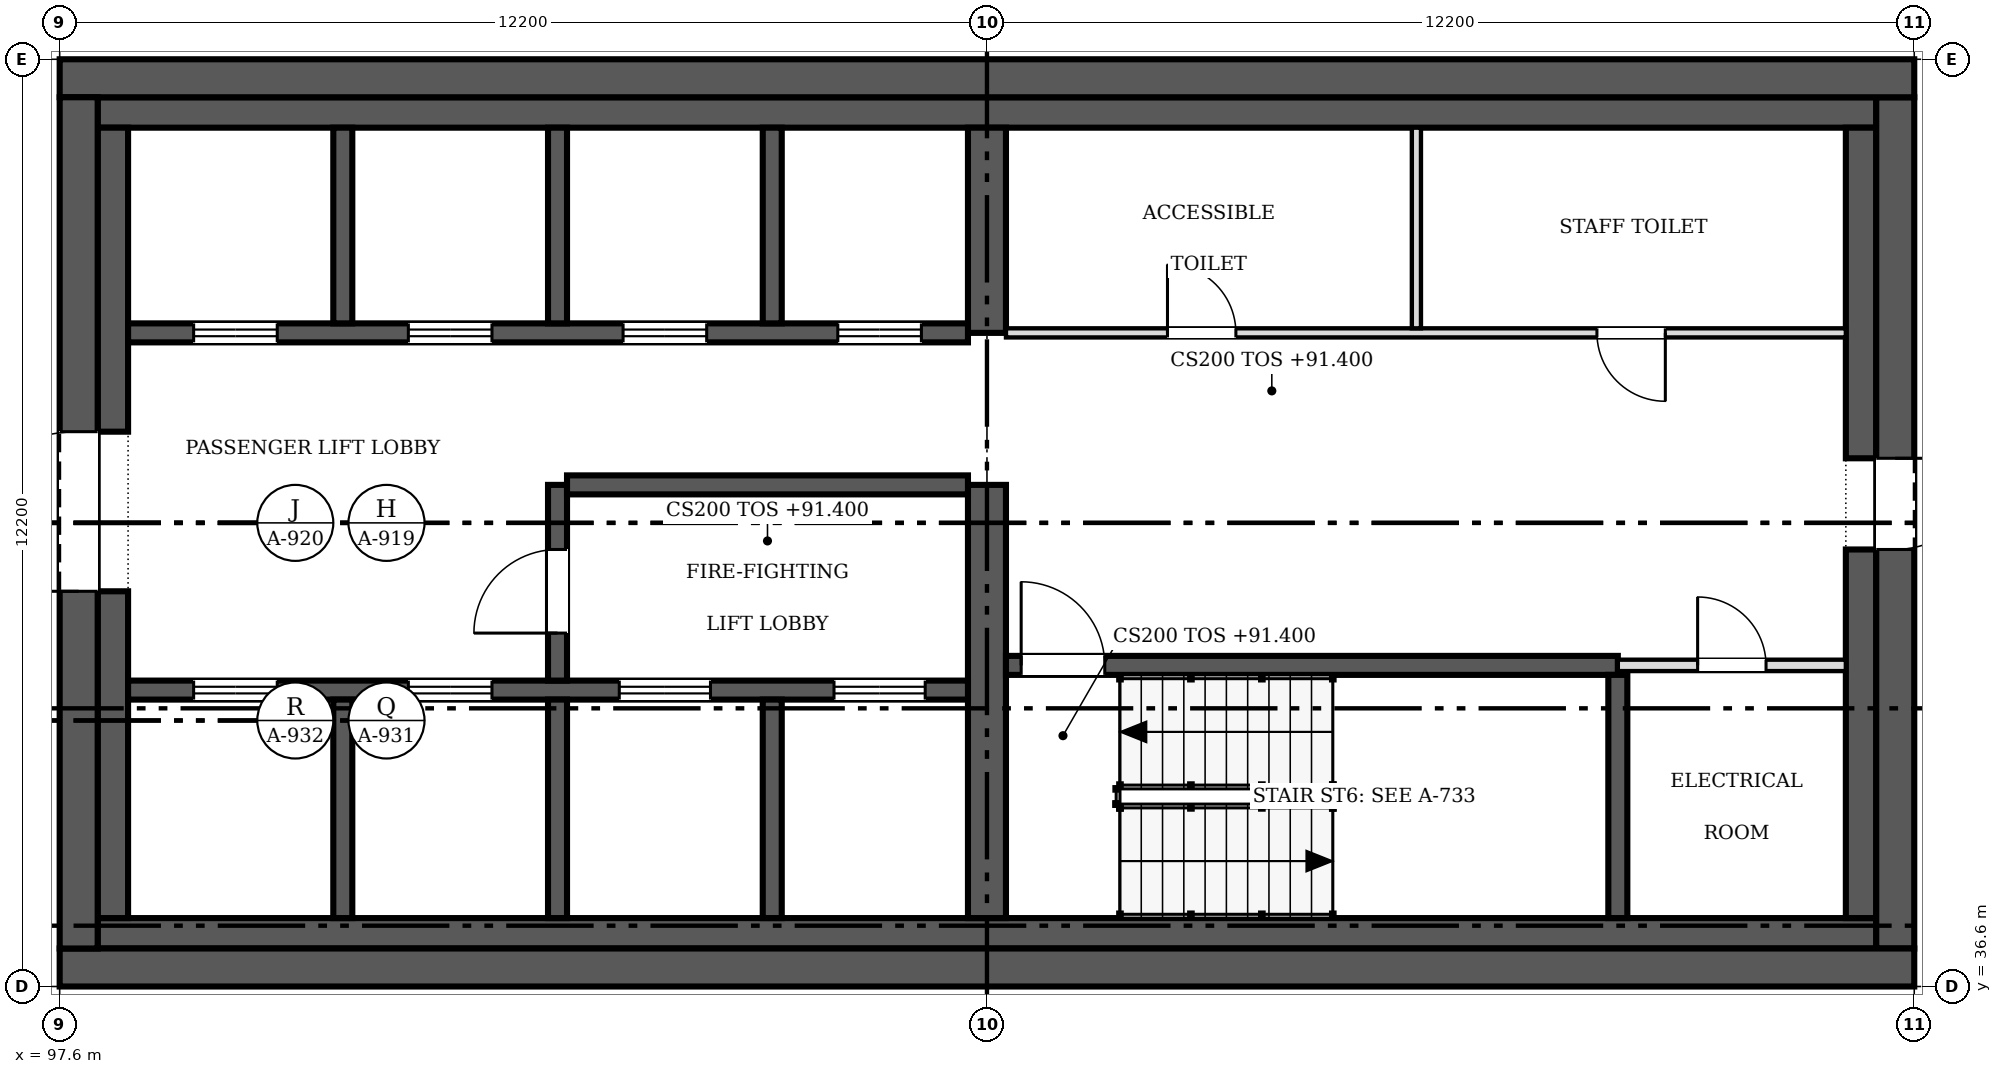
"""IFC4 building model, lengths in metres.
Left out: names, types, materials, properties, quantities, classifications, styles, units other than length and angle.
Written with IfcOpenShell. Run it as: python <this file> out.ifc"""

import sys

from ifc_helpers import new_model, si_unit, direction, frame, frame_2d, origin, place, context, subcontext, project, spatial, rectangle, extrude, source, transform, mapped, element, fill, save


model = new_model("IFC4")
c1 = context("Model", 3, precision=1e-05, world=origin(), true_north=direction((0.0, 1.0)))
c2 = subcontext(c1, "Body", "Model", "MODEL_VIEW")
j1 = project(units=[si_unit("LENGTHUNIT", "METRE"), si_unit("PLANEANGLEUNIT", "RADIAN")], contexts=[c1])
p1 = place(None, origin())
s1 = spatial("IfcSite", under=j1, at=p1, CompositionType="ELEMENT")
p2 = place(p1, origin())
s2 = spatial("IfcBuilding", under=s1, at=p2, CompositionType="ELEMENT")
p3 = place(p2, frame((0.0, 0.0, 91.4)))
s3 = spatial("IfcBuildingStorey", under=s2, at=p3, CompositionType="ELEMENT", Elevation=91.4)
p4 = place(p3, frame((122.0, 36.85, 0.0), z_axis=(0.0, 0.0, 1.0), x_axis=(-1.0, 0.0, 0.0)))
e1 = element("IfcWall", 1, at=p4, inside=s3, PredefinedType="SHEAR", context=c2, shape_type="SweptSolid", body=[
    extrude(rectangle(XDim=24.4, YDim=0.5, at=frame_2d((12.2, 0.0))), origin(), (0.0, 0.0, 1.0), 3.8),
])
p5 = place(p3, frame((97.85, 37.1, 0.0), z_axis=(0.0, 0.0, 1.0), x_axis=(0.0, 1.0, 0.0)))
e2 = element("IfcWall", 2, at=p5, inside=s3, PredefinedType="SHEAR", context=c2, shape_type="SweptSolid", body=[
    extrude(rectangle(XDim=11.2, YDim=0.5, at=frame_2d((5.6, 0.0))), origin(), (0.0, 0.0, 1.0), 3.8),
])
m1 = source(origin(), c2, "Body", "SweptSolid", [
    extrude(rectangle(XDim=2.1, YDim=2.4, at=frame_2d((1.05, 1.2))), frame((0.0, 0.26, 0.0), z_axis=(0.0, -1.0, 0.0), x_axis=(1.0, 0.0, 0.0)), (0.0, 0.0, 1.0), 0.52),
])
p6 = place(p5, frame((4.7, 0.0, 0.0)))
e3 = element("IfcOpeningElement", 3, at=p6, cuts=e2, PredefinedType="OPENING", context=c2, shape_type="MappedRepresentation", body=[
    mapped(m1, transform((0.0, 0.0, 0.0), scale=1.0)),
])
p7 = place(p3, frame((97.6, 48.55, 0.0), z_axis=(0.0, 0.0, 1.0), x_axis=(1.0, 0.0, 0.0)))
e4 = element("IfcWall", 4, at=p7, inside=s3, PredefinedType="SHEAR", context=c2, shape_type="SweptSolid", body=[
    extrude(rectangle(XDim=24.4, YDim=0.5, at=frame_2d((12.2, 0.0))), origin(), (0.0, 0.0, 1.0), 3.8),
])
p8 = place(p3, frame((121.75, 48.3, 0.0), z_axis=(0.0, 0.0, 1.0), x_axis=(0.0, -1.0, 0.0)))
e5 = element("IfcWall", 5, at=p8, inside=s3, PredefinedType="SHEAR", context=c2, shape_type="SweptSolid", body=[
    extrude(rectangle(XDim=11.2, YDim=0.5, at=frame_2d((5.6, 0.0))), origin(), (0.0, 0.0, 1.0), 3.8),
])
m2 = source(origin(), c2, "Body", "SweptSolid", [
    extrude(rectangle(XDim=1.2, YDim=2.1, at=frame_2d((0.6, 1.05))), frame((0.0, 0.26, 0.0), z_axis=(0.0, -1.0, 0.0), x_axis=(1.0, 0.0, 0.0)), (0.0, 0.0, 1.0), 0.52),
])
p9 = place(p8, frame((4.75, 0.0, 0.0)))
e6 = element("IfcOpeningElement", 6, at=p9, cuts=e5, PredefinedType="OPENING", context=c2, shape_type="MappedRepresentation", body=[
    mapped(m2, transform((0.0, 0.0, 0.0), scale=1.0)),
])
for number, where, z_axis, x_axis in (
    (7, (98.1, 37.3, 0.0), (0.0, 0.0, 1.0), (1.0, 0.0, 0.0)),
    (8, (98.1, 48.1, 0.0), (0.0, 0.0, 1.0), (1.0, 0.0, 0.0)),
):
    element("IfcWall", number, at=place(p3, frame(where, z_axis=z_axis, x_axis=x_axis)), inside=s3, PredefinedType="SOLIDWALL", context=c2, shape_type="SweptSolid", body=[
        extrude(rectangle(XDim=23.4, YDim=0.4, at=frame_2d((11.7, 0.0))), origin(), (0.0, 0.0, 1.0), 3.8),
    ])
p10 = place(p3, frame((98.3, 37.5, 0.0), z_axis=(0.0, 0.0, 1.0), x_axis=(0.0, 1.0, 0.0)))
e9 = element("IfcWall", 9, at=p10, inside=s3, PredefinedType="SOLIDWALL", context=c2, shape_type="SweptSolid", body=[
    extrude(rectangle(XDim=4.3, YDim=0.4, at=frame_2d((2.15, 0.0))), origin(), (0.0, 0.0, 1.0), 3.8),
])
p11 = place(p3, frame((98.3, 43.9, 0.0), z_axis=(0.0, 0.0, 1.0), x_axis=(0.0, 1.0, 0.0)))
e10 = element("IfcWall", 10, at=p11, inside=s3, PredefinedType="SOLIDWALL", context=c2, shape_type="SweptSolid", body=[
    extrude(rectangle(XDim=4.0, YDim=0.4, at=frame_2d((2.0, 0.0))), origin(), (0.0, 0.0, 1.0), 3.8),
])
p12 = place(p3, frame((121.3, 37.5, 0.0), z_axis=(0.0, 0.0, 1.0), x_axis=(0.0, 1.0, 0.0)))
e11 = element("IfcWall", 11, at=p12, inside=s3, PredefinedType="SOLIDWALL", context=c2, shape_type="SweptSolid", body=[
    extrude(rectangle(XDim=4.85, YDim=0.4, at=frame_2d((2.425, 0.0))), origin(), (0.0, 0.0, 1.0), 3.8),
])
p13 = place(p3, frame((121.3, 43.55, 0.0), z_axis=(0.0, 0.0, 1.0), x_axis=(0.0, 1.0, 0.0)))
e12 = element("IfcWall", 12, at=p13, inside=s3, PredefinedType="SOLIDWALL", context=c2, shape_type="SweptSolid", body=[
    extrude(rectangle(XDim=4.35, YDim=0.4, at=frame_2d((2.175, 0.0))), origin(), (0.0, 0.0, 1.0), 3.8),
])
p14 = place(p3, frame((109.8, 37.5, 0.0), z_axis=(0.0, 0.0, 1.0), x_axis=(0.0, 1.0, 0.0)))
e13 = element("IfcWall", 13, at=p14, inside=s3, PredefinedType="SHEAR", context=c2, shape_type="SweptSolid", body=[
    extrude(rectangle(XDim=5.7, YDim=0.5, at=frame_2d((2.85, 0.0))), origin(), (0.0, 0.0, 1.0), 3.8),
])
p15 = place(p3, frame((109.8, 45.2, 0.0), z_axis=(0.0, 0.0, 1.0), x_axis=(0.0, 1.0, 0.0)))
e14 = element("IfcWall", 14, at=p15, inside=s3, PredefinedType="SHEAR", context=c2, shape_type="SweptSolid", body=[
    extrude(rectangle(XDim=2.7, YDim=0.5, at=frame_2d((1.35, 0.0))), origin(), (0.0, 0.0, 1.0), 3.8),
])
p16 = place(p3, frame((98.5, 40.5, 0.0), z_axis=(0.0, 0.0, 1.0), x_axis=(1.0, 0.0, 0.0)))
e15 = element("IfcWall", 15, at=p16, inside=s3, PredefinedType="SOLIDWALL", context=c2, shape_type="SweptSolid", body=[
    extrude(rectangle(XDim=11.05, YDim=0.25, at=frame_2d((5.525, 0.0))), origin(), (0.0, 0.0, 1.0), 3.8),
])
m3 = source(origin(), c2, "Body", "SweptSolid", [
    extrude(rectangle(XDim=1.1, YDim=2.1, at=frame_2d((0.55, 1.05))), frame((0.0, 0.135, 0.0), z_axis=(0.0, -1.0, 0.0), x_axis=(1.0, 0.0, 0.0)), (0.0, 0.0, 1.0), 0.27),
])
p17 = place(p16, frame((0.863, 0.0, 0.0)))
e16 = element("IfcOpeningElement", 16, at=p17, cuts=e15, PredefinedType="OPENING", context=c2, shape_type="MappedRepresentation", body=[
    mapped(m3, transform((0.0, 0.0, 0.0), scale=1.0)),
])
p18 = place(p16, frame((3.688, 0.0, 0.0)))
e17 = element("IfcOpeningElement", 17, at=p18, cuts=e15, PredefinedType="OPENING", context=c2, shape_type="MappedRepresentation", body=[
    mapped(m3, transform((0.0, 0.0, 0.0), scale=1.0)),
])
m4 = source(origin(), c2, "Body", "SweptSolid", [
    extrude(rectangle(XDim=1.2, YDim=2.1, at=frame_2d((0.6, 1.05))), frame((0.0, 0.135, 0.0), z_axis=(0.0, -1.0, 0.0), x_axis=(1.0, 0.0, 0.0)), (0.0, 0.0, 1.0), 0.27),
])
p19 = place(p16, frame((6.462, 0.0, 0.0)))
e18 = element("IfcOpeningElement", 18, at=p19, cuts=e15, PredefinedType="OPENING", context=c2, shape_type="MappedRepresentation", body=[
    mapped(m4, transform((0.0, 0.0, 0.0), scale=1.0)),
])
p20 = place(p16, frame((9.288, 0.0, 0.0)))
e19 = element("IfcOpeningElement", 19, at=p20, cuts=e15, PredefinedType="OPENING", context=c2, shape_type="MappedRepresentation", body=[
    mapped(m4, transform((0.0, 0.0, 0.0), scale=1.0)),
])
p21 = place(p3, frame((109.55, 45.2, 0.0), z_axis=(0.0, 0.0, 1.0), x_axis=(-1.0, 0.0, 0.0)))
e20 = element("IfcWall", 20, at=p21, inside=s3, PredefinedType="SOLIDWALL", context=c2, shape_type="SweptSolid", body=[
    extrude(rectangle(XDim=11.05, YDim=0.25, at=frame_2d((5.525, 0.0))), origin(), (0.0, 0.0, 1.0), 3.8),
])
p22 = place(p21, frame((9.087, 0.0, 0.0)))
e21 = element("IfcOpeningElement", 21, at=p22, cuts=e20, PredefinedType="OPENING", context=c2, shape_type="MappedRepresentation", body=[
    mapped(m3, transform((0.0, 0.0, 0.0), scale=1.0)),
])
p23 = place(p21, frame((6.262, 0.0, 0.0)))
e22 = element("IfcOpeningElement", 22, at=p23, cuts=e20, PredefinedType="OPENING", context=c2, shape_type="MappedRepresentation", body=[
    mapped(m3, transform((0.0, 0.0, 0.0), scale=1.0)),
])
p24 = place(p21, frame((3.438, 0.0, 0.0)))
e23 = element("IfcOpeningElement", 23, at=p24, cuts=e20, PredefinedType="OPENING", context=c2, shape_type="MappedRepresentation", body=[
    mapped(m3, transform((0.0, 0.0, 0.0), scale=1.0)),
])
p25 = place(p21, frame((0.613, 0.0, 0.0)))
e24 = element("IfcOpeningElement", 24, at=p25, cuts=e20, PredefinedType="OPENING", context=c2, shape_type="MappedRepresentation", body=[
    mapped(m3, transform((0.0, 0.0, 0.0), scale=1.0)),
])
p26 = place(p3, frame((118.1, 40.825, 0.0), z_axis=(0.0, 0.0, 1.0), x_axis=(-1.0, 0.0, 0.0)))
e25 = element("IfcWall", 25, at=p26, inside=s3, PredefinedType="SOLIDWALL", context=c2, shape_type="SweptSolid", body=[
    extrude(rectangle(XDim=8.05, YDim=0.25, at=frame_2d((4.025, 0.0))), origin(), (0.0, 0.0, 1.0), 3.8),
])
p27 = place(p26, frame((6.75, 0.0, 0.0)))
e26 = element("IfcOpeningElement", 26, at=p27, cuts=e25, PredefinedType="OPENING", context=c2, shape_type="MappedRepresentation", body=[
    mapped(m3, transform((0.0, 0.0, 0.0), scale=1.0)),
])
p28 = place(p3, frame((104.15, 37.5, 0.0), z_axis=(0.0, 0.0, 1.0), x_axis=(0.0, 1.0, 0.0)))
e27 = element("IfcWall", 27, at=p28, inside=s3, PredefinedType="SOLIDWALL", context=c2, shape_type="SweptSolid", body=[
    extrude(rectangle(XDim=2.875, YDim=0.25, at=frame_2d((1.438, 0.0))), origin(), (0.0, 0.0, 1.0), 3.8),
])
p29 = place(p3, frame((104.15, 43.2, 0.0), z_axis=(0.0, 0.0, 1.0), x_axis=(0.0, -1.0, 0.0)))
e28 = element("IfcWall", 28, at=p29, inside=s3, PredefinedType="SOLIDWALL", context=c2, shape_type="SweptSolid", body=[
    extrude(rectangle(XDim=2.575, YDim=0.25, at=frame_2d((1.288, 0.0))), origin(), (0.0, 0.0, 1.0), 3.8),
])
p30 = place(p29, frame((0.85, 0.0, 0.0)))
e29 = element("IfcOpeningElement", 29, at=p30, cuts=e28, PredefinedType="OPENING", context=c2, shape_type="MappedRepresentation", body=[
    mapped(m3, transform((0.0, 0.0, 0.0), scale=1.0)),
])
p31 = place(p3, frame((104.275, 43.2, 0.0), z_axis=(0.0, 0.0, 1.0), x_axis=(1.0, 0.0, 0.0)))
e30 = element("IfcWall", 30, at=p31, inside=s3, PredefinedType="SOLIDWALL", context=c2, shape_type="SweptSolid", body=[
    extrude(rectangle(XDim=5.275, YDim=0.25, at=frame_2d((2.638, 0.0))), origin(), (0.0, 0.0, 1.0), 3.8),
])
p32 = place(p3, frame((118.1, 37.5, 0.0), z_axis=(0.0, 0.0, 1.0), x_axis=(0.0, 1.0, 0.0)))
e31 = element("IfcWall", 31, at=p32, inside=s3, PredefinedType="SOLIDWALL", context=c2, shape_type="SweptSolid", body=[
    extrude(rectangle(XDim=3.2, YDim=0.25, at=frame_2d((1.6, 0.0))), origin(), (0.0, 0.0, 1.0), 3.8),
])
for number, where, z_axis, x_axis in (
    (32, (101.325, 37.5, 0.0), (0.0, 0.0, 1.0), (0.0, 1.0, 0.0)),
    (33, (106.975, 37.5, 0.0), (0.0, 0.0, 1.0), (0.0, 1.0, 0.0)),
):
    element("IfcWall", number, at=place(p3, frame(where, z_axis=z_axis, x_axis=x_axis)), inside=s3, PredefinedType="SOLIDWALL", context=c2, shape_type="SweptSolid", body=[
        extrude(rectangle(XDim=2.875, YDim=0.25, at=frame_2d((1.438, 0.0))), origin(), (0.0, 0.0, 1.0), 3.8),
    ])
for number, where, z_axis, x_axis in (
    (34, (101.325, 45.325, 0.0), (0.0, 0.0, 1.0), (0.0, 1.0, 0.0)),
    (35, (104.15, 45.325, 0.0), (0.0, 0.0, 1.0), (0.0, 1.0, 0.0)),
    (36, (106.975, 45.325, 0.0), (0.0, 0.0, 1.0), (0.0, 1.0, 0.0)),
):
    element("IfcWall", number, at=place(p3, frame(where, z_axis=z_axis, x_axis=x_axis)), inside=s3, PredefinedType="SOLIDWALL", context=c2, shape_type="SweptSolid", body=[
        extrude(rectangle(XDim=2.575, YDim=0.25, at=frame_2d((1.288, 0.0))), origin(), (0.0, 0.0, 1.0), 3.8),
    ])
p33 = place(p3, frame((110.05, 45.2, 0.0), z_axis=(0.0, 0.0, 1.0), x_axis=(1.0, 0.0, 0.0)))
e37 = element("IfcWall", 37, at=p33, inside=s3, PredefinedType="PARTITIONING", context=c2, shape_type="SweptSolid", body=[
    extrude(rectangle(XDim=11.05, YDim=0.12, at=frame_2d((5.525, 0.0))), origin(), (0.0, 0.0, 1.0), 3.6),
])
m5 = source(origin(), c2, "Body", "SweptSolid", [
    extrude(rectangle(XDim=0.9, YDim=2.1, at=frame_2d((0.45, 1.05))), frame((0.0, 0.07, 0.0), z_axis=(0.0, -1.0, 0.0), x_axis=(1.0, 0.0, 0.0)), (0.0, 0.0, 1.0), 0.14),
])
p34 = place(p33, frame((2.125, 0.0, 0.0)))
e38 = element("IfcOpeningElement", 38, at=p34, cuts=e37, PredefinedType="OPENING", context=c2, shape_type="MappedRepresentation", body=[
    mapped(m5, transform((0.0, 0.0, 0.0), scale=1.0)),
])
p35 = place(p33, frame((7.775, 0.0, 0.0)))
e39 = element("IfcOpeningElement", 39, at=p35, cuts=e37, PredefinedType="OPENING", context=c2, shape_type="MappedRepresentation", body=[
    mapped(m5, transform((0.0, 0.0, 0.0), scale=1.0)),
])
p36 = place(p3, frame((121.1, 40.825, 0.0), z_axis=(0.0, 0.0, 1.0), x_axis=(-1.0, 0.0, 0.0)))
e40 = element("IfcWall", 40, at=p36, inside=s3, PredefinedType="PARTITIONING", context=c2, shape_type="SweptSolid", body=[
    extrude(rectangle(XDim=3.0, YDim=0.15, at=frame_2d((1.5, 0.0))), origin(), (0.0, 0.0, 1.0), 3.6),
])
m6 = source(origin(), c2, "Body", "SweptSolid", [
    extrude(rectangle(XDim=0.9, YDim=2.1, at=frame_2d((0.45, 1.05))), frame((0.0, 0.085, 0.0), z_axis=(0.0, -1.0, 0.0), x_axis=(1.0, 0.0, 0.0)), (0.0, 0.0, 1.0), 0.17),
])
p37 = place(p36, frame((1.05, 0.0, 0.0)))
e41 = element("IfcOpeningElement", 41, at=p37, cuts=e40, PredefinedType="OPENING", context=c2, shape_type="MappedRepresentation", body=[
    mapped(m6, transform((0.0, 0.0, 0.0), scale=1.0)),
])
p38 = place(p3, frame((115.45, 45.26, 0.0), z_axis=(0.0, 0.0, 1.0), x_axis=(0.0, 1.0, 0.0)))
e42 = element("IfcWall", 42, at=p38, inside=s3, PredefinedType="PARTITIONING", context=c2, shape_type="SweptSolid", body=[
    extrude(rectangle(XDim=2.64, YDim=0.12, at=frame_2d((1.32, 0.0))), origin(), (0.0, 0.0, 1.0), 3.6),
])
m7 = source(origin(), c2, "Body", "SweptSolid", [
    extrude(rectangle(XDim=2.1, YDim=2.4, at=frame_2d((1.05, 1.2))), frame((0.0, 0.025, 0.0), z_axis=(0.0, -1.0, 0.0), x_axis=(1.0, 0.0, 0.0)), (0.0, 0.0, 1.0), 0.05),
])
p39 = place(p6, origin())
e43 = element("IfcDoor", 43, at=p39, inside=s3, OperationType="DOUBLE_DOOR_SINGLE_SWING", PredefinedType="DOOR", context=c2, shape_type="MappedRepresentation", body=[
    mapped(m7, transform((0.0, 0.0, 0.0), scale=1.0)),
])
fill(e3, e43)
m8 = source(origin(), c2, "Body", "SweptSolid", [
    extrude(rectangle(XDim=1.2, YDim=2.1, at=frame_2d((0.6, 1.05))), frame((0.0, 0.025, 0.0), z_axis=(0.0, -1.0, 0.0), x_axis=(1.0, 0.0, 0.0)), (0.0, 0.0, 1.0), 0.05),
])
p40 = place(p9, origin())
e44 = element("IfcDoor", 44, at=p40, inside=s3, OperationType="SINGLE_SWING_LEFT", PredefinedType="DOOR", context=c2, shape_type="MappedRepresentation", body=[
    mapped(m8, transform((0.0, 0.0, 0.0), scale=1.0)),
])
fill(e6, e44)
m9 = source(origin(), c2, "Body", "SweptSolid", [
    extrude(rectangle(XDim=1.1, YDim=2.1, at=frame_2d((0.55, 1.05))), frame((0.0, 0.025, 0.0), z_axis=(0.0, -1.0, 0.0), x_axis=(1.0, 0.0, 0.0)), (0.0, 0.0, 1.0), 0.05),
])
p41 = place(p17, origin())
e45 = element("IfcDoor", 45, at=p41, inside=s3, OperationType="DOUBLE_DOOR_SLIDING", PredefinedType="DOOR", context=c2, shape_type="MappedRepresentation", body=[
    mapped(m9, transform((0.0, 0.0, 0.0), scale=1.0)),
])
fill(e16, e45)
p42 = place(p18, origin())
e46 = element("IfcDoor", 46, at=p42, inside=s3, OperationType="DOUBLE_DOOR_SLIDING", PredefinedType="DOOR", context=c2, shape_type="MappedRepresentation", body=[
    mapped(m9, transform((0.0, 0.0, 0.0), scale=1.0)),
])
fill(e17, e46)
p43 = place(p19, origin())
e47 = element("IfcDoor", 47, at=p43, inside=s3, OperationType="DOUBLE_DOOR_SLIDING", PredefinedType="DOOR", context=c2, shape_type="MappedRepresentation", body=[
    mapped(m8, transform((0.0, 0.0, 0.0), scale=1.0)),
])
fill(e18, e47)
p44 = place(p20, origin())
e48 = element("IfcDoor", 48, at=p44, inside=s3, OperationType="DOUBLE_DOOR_SLIDING", PredefinedType="DOOR", context=c2, shape_type="MappedRepresentation", body=[
    mapped(m8, transform((0.0, 0.0, 0.0), scale=1.0)),
])
fill(e19, e48)
p45 = place(p22, origin())
e49 = element("IfcDoor", 49, at=p45, inside=s3, OperationType="DOUBLE_DOOR_SLIDING", PredefinedType="DOOR", context=c2, shape_type="MappedRepresentation", body=[
    mapped(m9, transform((0.0, 0.0, 0.0), scale=1.0)),
])
fill(e21, e49)
p46 = place(p23, origin())
e50 = element("IfcDoor", 50, at=p46, inside=s3, OperationType="DOUBLE_DOOR_SLIDING", PredefinedType="DOOR", context=c2, shape_type="MappedRepresentation", body=[
    mapped(m9, transform((0.0, 0.0, 0.0), scale=1.0)),
])
fill(e22, e50)
p47 = place(p24, origin())
e51 = element("IfcDoor", 51, at=p47, inside=s3, OperationType="DOUBLE_DOOR_SLIDING", PredefinedType="DOOR", context=c2, shape_type="MappedRepresentation", body=[
    mapped(m9, transform((0.0, 0.0, 0.0), scale=1.0)),
])
fill(e23, e51)
p48 = place(p25, origin())
e52 = element("IfcDoor", 52, at=p48, inside=s3, OperationType="DOUBLE_DOOR_SLIDING", PredefinedType="DOOR", context=c2, shape_type="MappedRepresentation", body=[
    mapped(m9, transform((0.0, 0.0, 0.0), scale=1.0)),
])
fill(e24, e52)
p49 = place(p27, origin())
e53 = element("IfcDoor", 53, at=p49, inside=s3, OperationType="SINGLE_SWING_RIGHT", PredefinedType="DOOR", context=c2, shape_type="MappedRepresentation", body=[
    mapped(m9, transform((0.0, 0.0, 0.0), scale=1.0)),
])
fill(e26, e53)
p50 = place(p30, origin())
e54 = element("IfcDoor", 54, at=p50, inside=s3, OperationType="SINGLE_SWING_RIGHT", PredefinedType="DOOR", context=c2, shape_type="MappedRepresentation", body=[
    mapped(m9, transform((0.0, 0.0, 0.0), scale=1.0)),
])
fill(e29, e54)
m10 = source(origin(), c2, "Body", "SweptSolid", [
    extrude(rectangle(XDim=0.9, YDim=2.1, at=frame_2d((0.45, 1.05))), frame((0.0, 0.025, 0.0), z_axis=(0.0, -1.0, 0.0), x_axis=(1.0, 0.0, 0.0)), (0.0, 0.0, 1.0), 0.05),
])
p51 = place(p34, origin())
e55 = element("IfcDoor", 55, at=p51, inside=s3, OperationType="SINGLE_SWING_LEFT", PredefinedType="DOOR", context=c2, shape_type="MappedRepresentation", body=[
    mapped(m10, transform((0.0, 0.0, 0.0), scale=1.0)),
])
fill(e38, e55)
p52 = place(p35, origin())
e56 = element("IfcDoor", 56, at=p52, inside=s3, OperationType="SINGLE_SWING_RIGHT", PredefinedType="DOOR", context=c2, shape_type="MappedRepresentation", body=[
    mapped(m10, transform((0.0, 0.0, 0.0), scale=1.0)),
])
fill(e39, e56)
p53 = place(p37, origin())
e57 = element("IfcDoor", 57, at=p53, inside=s3, OperationType="SINGLE_SWING_RIGHT", PredefinedType="DOOR", context=c2, shape_type="MappedRepresentation", body=[
    mapped(m10, transform((0.0, 0.0, 0.0), scale=1.0)),
])
fill(e41, e57)
save(model, sys.argv[1])
